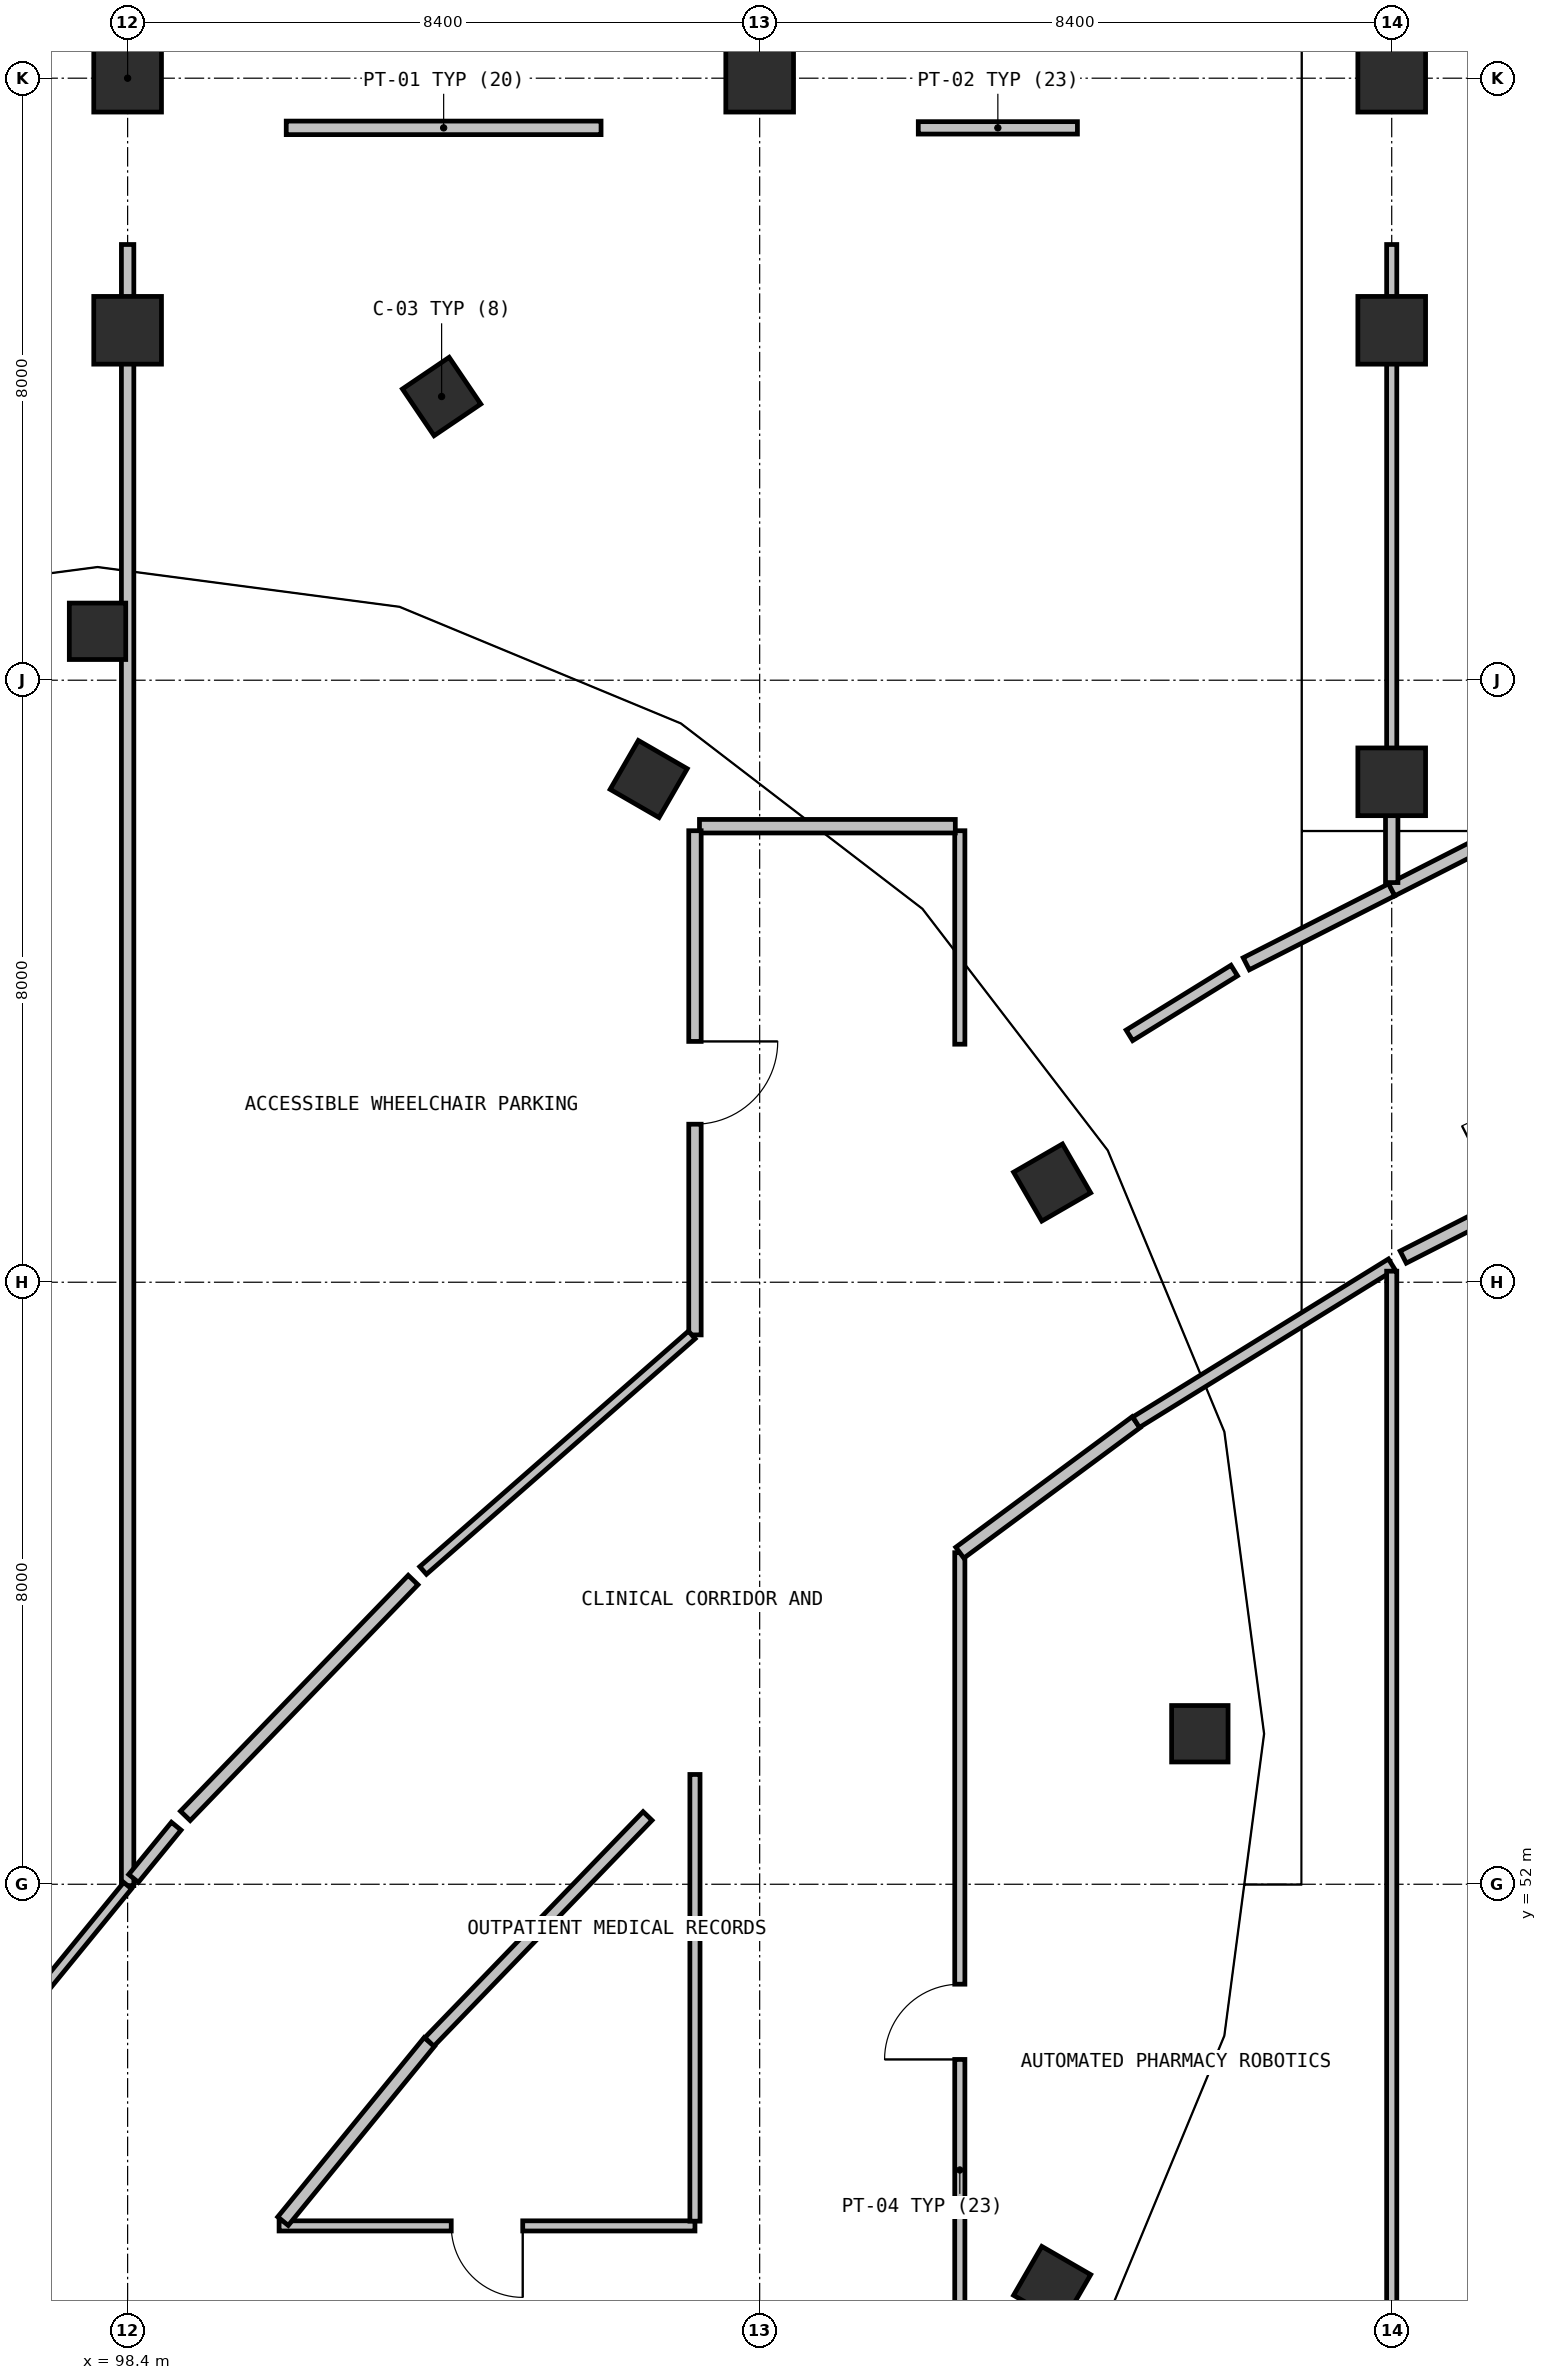
"""IFC4 building model, lengths in metres.
Left out: names, types, materials, properties, quantities, classifications, styles, units other than length and angle.
Written with IfcOpenShell. Run it as: python <this file> out.ifc"""

import sys

from ifc_helpers import new_model, si_unit, direction, frame, frame_2d, origin, origin_2d, place, context, subcontext, project, spatial, rectangle, circle, extrude, element, fill, save


model = new_model("IFC4")
c1 = context("Model", 3, precision=1e-05, world=origin(), true_north=direction((0.0, 1.0)))
c2 = subcontext(c1, "Body", "Model", "MODEL_VIEW")
j1 = project(units=[si_unit("LENGTHUNIT", "METRE"), si_unit("PLANEANGLEUNIT", "RADIAN")], contexts=[c1])
p1 = place(None, origin())
s1 = spatial("IfcSite", under=j1, at=p1, CompositionType="ELEMENT")
p2 = place(p1, origin())
s2 = spatial("IfcBuilding", under=s1, at=p2, CompositionType="ELEMENT")
p3 = place(p2, frame((0.0, 0.0, -4.8)))
s3 = spatial("IfcBuildingStorey", under=s2, at=p3, CompositionType="ELEMENT", Elevation=-4.8)
for number, where, z_axis, x_axis in (
    (1, (112.65, 54.0, 0.0), (0.0, 0.0, 1.0), (1.0, 0.0, 0.0)),
    (2, (110.687, 61.325, 0.0), (0.0, 0.0, 1.0), (0.866, 0.5, 0.0)),
    (3, (105.325, 66.687, 0.0), (0.0, 0.0, 1.0), (0.5, 0.866, 0.0)),
    (4, (98.0, 68.65, 0.0), (0.0, 0.0, 1.0), (0.0, 1.0, 0.0)),
    (5, (110.687, 46.675, 0.0), (0.0, 0.0, 1.0), (0.866, -0.5, 0.0)),
):
    element("IfcColumn", number, at=place(p3, frame(where, z_axis=z_axis, x_axis=x_axis)), inside=s3, PredefinedType="COLUMN", context=c2, shape_type="SweptSolid", body=[
        extrude(circle(Radius=0.375, at=origin_2d()), origin(), (0.0, 0.0, 1.0), 4.8),
    ])
for number, where, z_axis, x_axis in (
    (6, (98.4, 72.65, 0.0), (0.0, 0.0, 1.0), (1.0, 0.0, 0.0)),
    (7, (98.4, 76.0, 0.0), (0.0, 0.0, 1.0), (1.0, 0.0, 0.0)),
):
    element("IfcColumn", number, at=place(p3, frame(where, z_axis=z_axis, x_axis=x_axis)), inside=s3, PredefinedType="COLUMN", context=c2, shape_type="SweptSolid", body=[
        extrude(rectangle(XDim=0.9, YDim=0.9, at=origin_2d()), origin(), (0.0, 0.0, 1.0), 4.45),
    ])
p4 = place(p3, frame((106.8, 76.0, 0.0), z_axis=(0.0, 0.0, 1.0), x_axis=(1.0, 0.0, 0.0)))
e8 = element("IfcColumn", 8, at=p4, inside=s3, PredefinedType="COLUMN", context=c2, shape_type="SweptSolid", body=[
    extrude(rectangle(XDim=0.9, YDim=0.9, at=origin_2d()), origin(), (0.0, 0.0, 1.0), 4.565),
])
for number, where, z_axis, x_axis in (
    (9, (115.2, 66.65, 0.0), (0.0, 0.0, 1.0), (1.0, 0.0, 0.0)),
    (10, (115.2, 72.65, 0.0), (0.0, 0.0, 1.0), (1.0, 0.0, 0.0)),
    (11, (115.2, 76.0, 0.0), (0.0, 0.0, 1.0), (1.0, 0.0, 0.0)),
):
    element("IfcColumn", number, at=place(p3, frame(where, z_axis=z_axis, x_axis=x_axis)), inside=s3, PredefinedType="COLUMN", context=c2, shape_type="SweptSolid", body=[
        extrude(rectangle(XDim=0.9, YDim=0.9, at=origin_2d()), origin(), (0.0, 0.0, 1.0), 4.8),
    ])
p5 = place(p3, frame((102.573, 71.77, 0.0), z_axis=(0.0, 0.0, 1.0), x_axis=(-0.560725705765, 0.828001620104, 0.0)))
e12 = element("IfcColumn", 12, at=p5, inside=s3, PredefinedType="COLUMN", context=c2, shape_type="SweptSolid", body=[
    extrude(rectangle(XDim=0.75, YDim=0.75, at=origin_2d()), origin(), (0.0, 0.0, 1.0), 4.8),
])
p6 = place(p3, frame((98.4, 73.79, 0.0), z_axis=(0.0, 0.0, 1.0), x_axis=(0.0, -1.0, 0.0)))
e13 = element("IfcWall", 13, at=p6, inside=s3, PredefinedType="PARTITIONING", context=c2, shape_type="SweptSolid", body=[
    extrude(rectangle(XDim=21.808, YDim=0.165, at=frame_2d((10.904, 0.0))), origin(), (0.0, 0.0, 1.0), 4.45),
])
p7 = place(p3, frame((98.4, 51.982, 0.0), z_axis=(0.0, 0.0, 1.0), x_axis=(-0.632780039334, -0.774331596811, 0.0)))
e14 = element("IfcWall", 14, at=p7, inside=s3, PredefinedType="PARTITIONING", context=c2, shape_type="SweptSolid", body=[
    extrude(rectangle(XDim=3.341, YDim=0.135, at=frame_2d((1.67, 0.0))), origin(), (0.0, 0.0, 1.0), 4.45),
])
p8 = place(p3, frame((109.46, 40.0, 0.0), z_axis=(0.0, 0.0, 1.0), x_axis=(0.0, 1.0, 0.0)))
e15 = element("IfcWall", 15, at=p8, inside=s3, PredefinedType="PARTITIONING", context=c2, shape_type="SweptSolid", body=[
    extrude(rectangle(XDim=16.406, YDim=0.135, at=frame_2d((8.203, 0.0))), origin(), (0.0, 0.0, 1.0), 4.45),
])
p9 = place(p8, frame((9.672, 0.0, 0.0)))
e16 = element("IfcOpeningElement", 16, at=p9, cuts=e15, PredefinedType="OPENING", context=c2, shape_type="SweptSolid", body=[
    extrude(rectangle(XDim=1.0, YDim=2.15, at=frame_2d((0.5, 1.075))), frame((0.0, 0.077, 0.0), z_axis=(0.0, -1.0, 0.0), x_axis=(1.0, 0.0, 0.0)), (0.0, 0.0, 1.0), 0.155),
])
p10 = place(p3, frame((109.46, 56.406, 0.0), z_axis=(0.0, 0.0, 1.0), x_axis=(0.803833088097, 0.594854912125, 0.0)))
e17 = element("IfcWall", 17, at=p10, inside=s3, PredefinedType="PARTITIONING", context=c2, shape_type="SweptSolid", body=[
    extrude(rectangle(XDim=2.915, YDim=0.18, at=frame_2d((1.458, 0.0))), origin(), (0.0, 0.0, 1.0), 4.45),
])
p11 = place(p3, frame((111.803, 58.14, 0.0), z_axis=(0.0, 0.0, 1.0), x_axis=(0.850687032492, 0.525672495714, 0.0)))
e18 = element("IfcWall", 18, at=p11, inside=s3, PredefinedType="PARTITIONING", context=c2, shape_type="SweptSolid", body=[
    extrude(rectangle(XDim=3.993, YDim=0.165, at=frame_2d((1.997, 0.0))), origin(), (0.0, 0.0, 1.0), 4.45),
])
p12 = place(p3, frame((115.2, 60.147, 0.0), z_axis=(0.0, 0.0, 1.0), x_axis=(0.0, -1.0, 0.0)))
e19 = element("IfcWall", 19, at=p12, inside=s3, PredefinedType="PARTITIONING", context=c2, shape_type="SweptSolid", body=[
    extrude(rectangle(XDim=20.322, YDim=0.135, at=frame_2d((10.161, 0.0))), origin(), (0.0, 0.0, 1.0), 4.45),
])
p13 = place(p3, frame((100.508, 75.34, 0.0), z_axis=(0.0, 0.0, 1.0), x_axis=(1.0, 0.0, 0.0)))
e20 = element("IfcWall", 20, at=p13, inside=s3, PredefinedType="PARTITIONING", context=c2, shape_type="SweptSolid", body=[
    extrude(rectangle(XDim=4.184, YDim=0.18, at=frame_2d((2.092, 0.0))), origin(), (0.0, 0.0, 1.0), 4.45),
])
p14 = place(p3, frame((108.908, 75.34, 0.0), z_axis=(0.0, 0.0, 1.0), x_axis=(1.0, 0.0, 0.0)))
e21 = element("IfcWall", 21, at=p14, inside=s3, PredefinedType="PARTITIONING", context=c2, shape_type="SweptSolid", body=[
    extrude(rectangle(XDim=2.115, YDim=0.165, at=frame_2d((1.058, 0.0))), origin(), (0.0, 0.0, 1.0), 4.45),
])
p15 = place(p3, frame((115.2, 72.355, 0.0), z_axis=(0.0, 0.0, 1.0), x_axis=(0.0, -1.0, 0.0)))
e22 = element("IfcWall", 22, at=p15, inside=s3, PredefinedType="PARTITIONING", context=c2, shape_type="SweptSolid", body=[
    extrude(rectangle(XDim=5.41, YDim=0.135, at=frame_2d((2.705, 0.0))), origin(), (0.0, 0.0, 1.0), 3.7),
])
p16 = place(p3, frame((115.2, 65.215, 0.0), z_axis=(0.0, 0.0, 1.0), x_axis=(-0.891321133159, -0.45337251525, 0.0)))
e23 = element("IfcWall", 23, at=p16, inside=s3, PredefinedType="PARTITIONING", context=c2, shape_type="SweptSolid", body=[
    extrude(rectangle(XDim=2.168, YDim=0.18, at=frame_2d((1.084, 0.0))), origin(), (0.0, 0.0, 1.0), 4.45),
])
p17 = place(p3, frame((113.107, 64.142, 0.0), z_axis=(0.0, 0.0, 1.0), x_axis=(-0.850576382598, -0.525851516463, 0.0)))
e24 = element("IfcWall", 24, at=p17, inside=s3, PredefinedType="PARTITIONING", context=c2, shape_type="SweptSolid", body=[
    extrude(rectangle(XDim=1.637, YDim=0.165, at=frame_2d((0.819, 0.0))), origin(), (0.0, 0.0, 1.0), 4.45),
])
p18 = place(p3, frame((109.46, 63.163, 0.0), z_axis=(0.0, 0.0, 1.0), x_axis=(0.0, 1.0, 0.0)))
e25 = element("IfcWall", 25, at=p18, inside=s3, PredefinedType="PARTITIONING", context=c2, shape_type="SweptSolid", body=[
    extrude(rectangle(XDim=2.837, YDim=0.135, at=frame_2d((1.418, 0.0))), origin(), (0.0, 0.0, 1.0), 4.45),
])
p19 = place(p3, frame((109.4, 66.06, 0.0), z_axis=(0.0, 0.0, 1.0), x_axis=(-1.0, 0.0, 0.0)))
e26 = element("IfcWall", 26, at=p19, inside=s3, PredefinedType="PARTITIONING", context=c2, shape_type="SweptSolid", body=[
    extrude(rectangle(XDim=3.4, YDim=0.18, at=frame_2d((1.7, 0.0))), origin(), (0.0, 0.0, 1.0), 4.45),
])
p20 = place(p3, frame((105.94, 66.0, 0.0), z_axis=(0.0, 0.0, 1.0), x_axis=(0.0, -1.0, 0.0)))
e27 = element("IfcWall", 27, at=p20, inside=s3, PredefinedType="PARTITIONING", context=c2, shape_type="SweptSolid", body=[
    extrude(rectangle(XDim=6.7, YDim=0.165, at=frame_2d((3.35, 0.0))), origin(), (0.0, 0.0, 1.0), 4.45),
])
p21 = place(p20, frame((2.8, 0.0, 0.0)))
e28 = element("IfcOpeningElement", 28, at=p21, cuts=e27, PredefinedType="OPENING", context=c2, shape_type="SweptSolid", body=[
    extrude(rectangle(XDim=1.1, YDim=2.15, at=frame_2d((0.55, 1.075))), frame((0.0, 0.093, 0.0), z_axis=(0.0, -1.0, 0.0), x_axis=(1.0, 0.0, 0.0)), (0.0, 0.0, 1.0), 0.185),
])
p22 = place(p3, frame((105.898, 59.3, 0.0), z_axis=(0.0, 0.0, 1.0), x_axis=(-0.752006328674, -0.659155885686, 0.0)))
e29 = element("IfcWall", 29, at=p22, inside=s3, PredefinedType="PARTITIONING", context=c2, shape_type="SweptSolid", body=[
    extrude(rectangle(XDim=4.749, YDim=0.135, at=frame_2d((2.375, 0.0))), origin(), (0.0, 0.0, 1.0), 4.45),
])
p23 = place(p3, frame((102.194, 56.043, 0.0), z_axis=(0.0, 0.0, 1.0), x_axis=(-0.694729493299, -0.719271111015, 0.0)))
e30 = element("IfcWall", 30, at=p23, inside=s3, PredefinedType="PARTITIONING", context=c2, shape_type="SweptSolid", body=[
    extrude(rectangle(XDim=4.357, YDim=0.18, at=frame_2d((2.179, 0.0))), origin(), (0.0, 0.0, 1.0), 4.45),
])
p24 = place(p3, frame((99.046, 52.772, 0.0), z_axis=(0.0, 0.0, 1.0), x_axis=(-0.632569979501, -0.774503209182, 0.0)))
e31 = element("IfcWall", 31, at=p24, inside=s3, PredefinedType="PARTITIONING", context=c2, shape_type="SweptSolid", body=[
    extrude(rectangle(XDim=0.896, YDim=0.165, at=frame_2d((0.448, 0.0))), origin(), (0.0, 0.0, 1.0), 4.45),
])
p25 = place(p3, frame((105.94, 47.46, 0.0), z_axis=(0.0, 0.0, 1.0), x_axis=(-1.0, 0.0, 0.0)))
e32 = element("IfcWall", 32, at=p25, inside=s3, PredefinedType="PARTITIONING", context=c2, shape_type="SweptSolid", body=[
    extrude(rectangle(XDim=5.527, YDim=0.135, at=frame_2d((2.763, 0.0))), origin(), (0.0, 0.0, 1.0), 4.45),
])
p26 = place(p25, frame((2.289, 0.0, 0.0)))
e33 = element("IfcOpeningElement", 33, at=p26, cuts=e32, PredefinedType="OPENING", context=c2, shape_type="SweptSolid", body=[
    extrude(rectangle(XDim=0.95, YDim=2.1, at=frame_2d((0.475, 1.05))), frame((0.0, 0.077, 0.0), z_axis=(0.0, -1.0, 0.0), x_axis=(1.0, 0.0, 0.0)), (0.0, 0.0, 1.0), 0.155),
])
p27 = place(p3, frame((100.465, 47.523, 0.0), z_axis=(0.0, 0.0, 1.0), x_axis=(0.632428992504, 0.774618337919, 0.0)))
e34 = element("IfcWall", 34, at=p27, inside=s3, PredefinedType="PARTITIONING", context=c2, shape_type="SweptSolid", body=[
    extrude(rectangle(XDim=3.075, YDim=0.18, at=frame_2d((1.538, 0.0))), origin(), (0.0, 0.0, 1.0), 4.45),
])
p28 = place(p3, frame((102.41, 49.905, 0.0), z_axis=(0.0, 0.0, 1.0), x_axis=(0.694806380461, 0.719196839308, 0.0)))
e35 = element("IfcWall", 35, at=p28, inside=s3, PredefinedType="PARTITIONING", context=c2, shape_type="SweptSolid", body=[
    extrude(rectangle(XDim=4.174, YDim=0.165, at=frame_2d((2.087, 0.0))), origin(), (0.0, 0.0, 1.0), 4.45),
])
p29 = place(p3, frame((105.94, 53.459, 0.0), z_axis=(0.0, 0.0, 1.0), x_axis=(0.0, -1.0, 0.0)))
e36 = element("IfcWall", 36, at=p29, inside=s3, PredefinedType="PARTITIONING", context=c2, shape_type="SweptSolid", body=[
    extrude(rectangle(XDim=5.936, YDim=0.135, at=frame_2d((2.968, 0.0))), origin(), (0.0, 0.0, 1.0), 4.45),
])
p30 = place(p3, frame((115.353, 60.334, 0.0), z_axis=(0.0, 0.0, 1.0), x_axis=(0.891282591813, 0.453448278782, 0.0)))
e37 = element("IfcWall", 37, at=p30, inside=s3, PredefinedType="PARTITIONING", context=c2, shape_type="SweptSolid", body=[
    extrude(rectangle(XDim=4.175, YDim=0.18, at=frame_2d((2.087, 0.0))), origin(), (0.0, 0.0, 1.0), 4.45),
])
p31 = place(p30, frame((1.487, 0.0, 0.0)))
e38 = element("IfcOpeningElement", 38, at=p31, cuts=e37, PredefinedType="OPENING", context=c2, shape_type="SweptSolid", body=[
    extrude(rectangle(XDim=1.2, YDim=2.15, at=frame_2d((0.6, 1.075))), frame((0.0, 0.1, 0.0), z_axis=(0.0, -1.0, 0.0), x_axis=(1.0, 0.0, 0.0)), (0.0, 0.0, 1.0), 0.2),
])
p32 = place(p3, frame((117.151, 66.208, 0.0), z_axis=(0.0, 0.0, 1.0), x_axis=(-0.891214759651, -0.453581582718, 0.0)))
e39 = element("IfcWall", 39, at=p32, inside=s3, PredefinedType="PARTITIONING", context=c2, shape_type="SweptSolid", body=[
    extrude(rectangle(XDim=2.189, YDim=0.18, at=frame_2d((1.094, 0.0))), origin(), (0.0, 0.0, 1.0), 4.45),
])
p33 = place(p3, frame((115.2, 65.311, 0.0), z_axis=(0.0, 0.0, 1.0), x_axis=(0.0, 1.0, 0.0)))
e40 = element("IfcWall", 40, at=p33, inside=s3, PredefinedType="PARTITIONING", context=c2, shape_type="SweptSolid", body=[
    extrude(rectangle(XDim=1.634, YDim=0.165, at=frame_2d((0.817, 0.0))), origin(), (0.0, 0.0, 1.0), 3.7),
])
p34 = place(p3, frame((115.2, 72.355, 0.0), z_axis=(0.0, 0.0, 1.0), x_axis=(0.0, 1.0, 0.0)))
e41 = element("IfcWall", 41, at=p34, inside=s3, PredefinedType="PARTITIONING", context=c2, shape_type="SweptSolid", body=[
    extrude(rectangle(XDim=1.435, YDim=0.135, at=frame_2d((0.718, 0.0))), origin(), (0.0, 0.0, 1.0), 3.7),
])
p35 = place(p9, origin())
e42 = element("IfcDoor", 42, at=p35, inside=s3, OperationType="SINGLE_SWING_RIGHT", PredefinedType="DOOR", context=c2, shape_type="SweptSolid", body=[
    extrude(rectangle(XDim=1.0, YDim=2.15, at=frame_2d((0.5, 1.075))), frame((0.0, 0.025, 0.0), z_axis=(0.0, -1.0, 0.0), x_axis=(1.0, 0.0, 0.0)), (0.0, 0.0, 1.0), 0.05),
])
fill(e16, e42)
p36 = place(p21, origin())
e43 = element("IfcDoor", 43, at=p36, inside=s3, OperationType="SINGLE_SWING_LEFT", PredefinedType="DOOR", context=c2, shape_type="SweptSolid", body=[
    extrude(rectangle(XDim=1.1, YDim=2.15, at=frame_2d((0.55, 1.075))), frame((0.0, 0.025, 0.0), z_axis=(0.0, -1.0, 0.0), x_axis=(1.0, 0.0, 0.0)), (0.0, 0.0, 1.0), 0.05),
])
fill(e28, e43)
p37 = place(p26, origin())
e44 = element("IfcDoor", 44, at=p37, inside=s3, OperationType="SINGLE_SWING_RIGHT", PredefinedType="DOOR", context=c2, shape_type="SweptSolid", body=[
    extrude(rectangle(XDim=0.95, YDim=2.1, at=frame_2d((0.475, 1.05))), frame((0.0, 0.025, 0.0), z_axis=(0.0, -1.0, 0.0), x_axis=(1.0, 0.0, 0.0)), (0.0, 0.0, 1.0), 0.05),
])
fill(e33, e44)
save(model, sys.argv[1])
